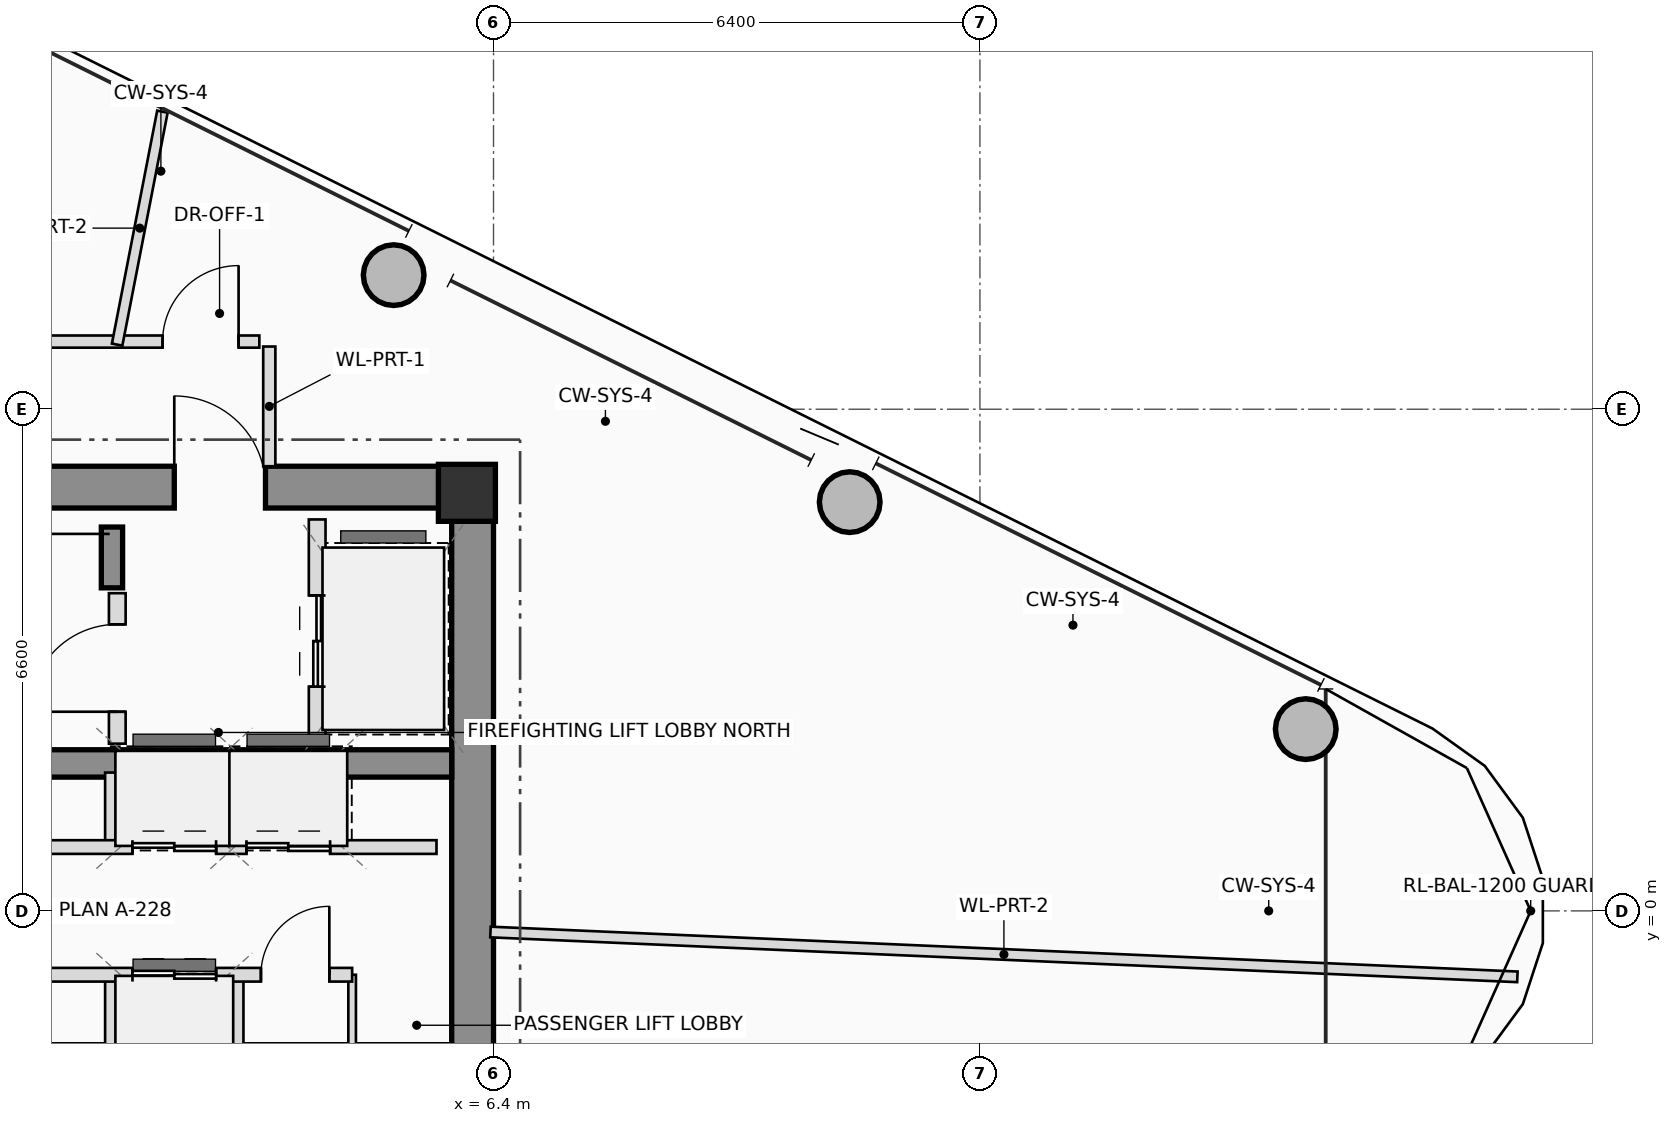
"""IFC4 building model, lengths in metres.
Left out: names, types, materials, properties, quantities, classifications, styles, units other than length and angle.
Written with IfcOpenShell. Run it as: python <this file> out.ifc"""

import sys

from ifc_helpers import new_model, si_unit, direction, frame, frame_2d, origin, origin_2d, place, context, subcontext, project, spatial, rectangle, hollow_circle, extrude, source, transform, mapped, element, fill, save


model = new_model("IFC4")
c1 = context("Model", 3, precision=1e-05, world=origin(), true_north=direction((0.0, 1.0)))
c2 = subcontext(c1, "Body", "Model", "MODEL_VIEW")
j1 = project(units=[si_unit("LENGTHUNIT", "METRE"), si_unit("PLANEANGLEUNIT", "RADIAN")], contexts=[c1])
p1 = place(None, origin())
s1 = spatial("IfcSite", under=j1, at=p1, CompositionType="ELEMENT")
p2 = place(p1, origin())
s2 = spatial("IfcBuilding", under=s1, at=p2, CompositionType="ELEMENT")
p3 = place(p2, frame((0.0, 0.0, 310.55)))
s3 = spatial("IfcBuildingStorey", under=s2, at=p3, CompositionType="ELEMENT", Elevation=310.55)
m1 = source(origin(), c2, "Body", "SweptSolid", [
    extrude(rectangle(XDim=0.75, YDim=0.75, at=origin_2d()), origin(), (0.0, 0.0, 1.0), 3.45),
])
p4 = place(p3, frame((6.05, 5.5, 0.0), z_axis=(0.0, 0.0, 1.0), x_axis=(1.0, 0.0, 0.0)))
e1 = element("IfcColumn", 1, at=p4, inside=s3, PredefinedType="COLUMN", context=c2, shape_type="MappedRepresentation", body=[
    mapped(m1, transform((0.0, 0.0, 0.0), scale=1.0)),
])
p5 = place(p3, frame((-6.4, 5.575, 0.0), z_axis=(0.0, 0.0, 1.0), x_axis=(1.0, 0.0, 0.0)))
e2 = element("IfcWall", 2, at=p5, inside=s3, PredefinedType="SHEAR", context=c2, shape_type="SweptSolid", body=[
    extrude(rectangle(XDim=12.8, YDim=0.55, at=frame_2d((6.4, 0.0))), origin(), (0.0, 0.0, 1.0), 3.45),
])
p6 = place(p5, frame((8.6, 0.0, 0.0)))
e3 = element("IfcOpeningElement", 3, at=p6, cuts=e2, PredefinedType="OPENING", context=c2, shape_type="SweptSolid", body=[
    extrude(rectangle(XDim=1.2, YDim=2.2, at=frame_2d((0.6, 1.1))), frame((0.0, 0.285, 0.0), z_axis=(0.0, -1.0, 0.0), x_axis=(1.0, 0.0, 0.0)), (0.0, 0.0, 1.0), 0.57),
])
p7 = place(p3, frame((6.125, -5.3, 0.0), z_axis=(0.0, 0.0, 1.0), x_axis=(0.0, 1.0, 0.0)))
e4 = element("IfcWall", 4, at=p7, inside=s3, PredefinedType="SHEAR", context=c2, shape_type="SweptSolid", body=[
    extrude(rectangle(XDim=10.6, YDim=0.55, at=frame_2d((5.3, 0.0))), origin(), (0.0, 0.0, 1.0), 3.45),
])
p8 = place(p3, frame((-5.85, 1.94, 0.0), z_axis=(0.0, 0.0, 1.0), x_axis=(1.0, 0.0, 0.0)))
e5 = element("IfcWall", 5, at=p8, inside=s3, PredefinedType="SHEAR", context=c2, shape_type="SweptSolid", body=[
    extrude(rectangle(XDim=11.7, YDim=0.36, at=frame_2d((5.85, 0.0))), origin(), (0.0, 0.0, 1.0), 3.45),
])
p9 = place(p3, frame((1.38, 4.25, 0.0), z_axis=(0.0, 0.0, 1.0), x_axis=(0.0, 1.0, 0.0)))
e6 = element("IfcWall", 6, at=p9, inside=s3, PredefinedType="SHEAR", context=c2, shape_type="SweptSolid", body=[
    extrude(rectangle(XDim=0.8, YDim=0.28, at=frame_2d((0.4, 0.0))), origin(), (0.0, 0.0, 1.0), 3.45),
])
m2 = source(origin(), c2, "Body", "SweptSolid", [
    extrude(hollow_circle(Radius=0.4, WallThickness=0.028, at=origin_2d()), origin(), (0.0, 0.0, 1.0), 3.45),
])
for number, where, z_axis, x_axis in (
    (7, (17.087, 2.392, 0.0), (0.0, 0.0, 1.0), (1.0, 0.0, 0.0)),
    (8, (11.086, 5.378, 0.0), (0.0, 0.0, 1.0), (1.0, 0.0, 0.0)),
    (9, (5.086, 8.364, 0.0), (0.0, 0.0, 1.0), (1.0, 0.0, 0.0)),
):
    element("IfcColumn", number, at=place(p3, frame(where, z_axis=z_axis, x_axis=x_axis)), inside=s3, PredefinedType="COLUMN", context=c2, shape_type="MappedRepresentation", body=[
        mapped(m2, transform((0.0, 0.0, 0.0), scale=1.0)),
    ])
p10 = place(p3, frame((1.45, 2.2, 0.0), z_axis=(0.0, 0.0, 1.0), x_axis=(0.0, 1.0, 0.0)))
e10 = element("IfcWall", 10, at=p10, inside=s3, PredefinedType="PLUMBINGWALL", context=c2, shape_type="SweptSolid", body=[
    extrude(rectangle(XDim=1.98, YDim=0.22, at=frame_2d((0.99, 0.0))), origin(), (0.0, 0.0, 1.0), 3.25),
])
p11 = place(p10, frame((0.42, 0.0, 0.0)))
e11 = element("IfcOpeningElement", 11, at=p11, cuts=e10, PredefinedType="OPENING", context=c2, shape_type="SweptSolid", body=[
    extrude(rectangle(XDim=1.15, YDim=2.15, at=frame_2d((0.575, 1.075))), frame((0.0, 0.12, 0.0), z_axis=(0.0, -1.0, 0.0), x_axis=(1.0, 0.0, 0.0)), (0.0, 0.0, 1.0), 0.24),
])
p12 = place(p3, frame((4.08, 2.2, 0.0), z_axis=(0.0, 0.0, 1.0), x_axis=(0.0, 1.0, 0.0)))
e12 = element("IfcWall", 12, at=p12, inside=s3, PredefinedType="PLUMBINGWALL", context=c2, shape_type="SweptSolid", body=[
    extrude(rectangle(XDim=2.95, YDim=0.22, at=frame_2d((1.475, 0.0))), origin(), (0.0, 0.0, 1.0), 3.25),
])
p13 = place(p12, frame((0.75, 0.0, 0.0)))
e13 = element("IfcOpeningElement", 13, at=p13, cuts=e12, PredefinedType="OPENING", context=c2, shape_type="SweptSolid", body=[
    extrude(rectangle(XDim=1.2, YDim=2.25, at=frame_2d((0.6, 1.125))), frame((0.0, 0.12, 0.0), z_axis=(0.0, -1.0, 0.0), x_axis=(1.0, 0.0, 0.0)), (0.0, 0.0, 1.0), 0.24),
])
for number, where, z_axis, x_axis in (
    (14, (1.38, 0.84, 0.0), (0.0, 0.0, 1.0), (0.0, 1.0, 0.0)),
    (15, (1.38, -1.82, 0.0), (0.0, 0.0, 1.0), (0.0, 1.0, 0.0)),
    (16, (3.02, 0.84, 0.0), (0.0, 0.0, 1.0), (0.0, 1.0, 0.0)),
    (17, (4.38, 0.84, 0.0), (0.0, 0.0, 1.0), (0.0, 1.0, 0.0)),
    (18, (3.02, -1.82, 0.0), (0.0, 0.0, 1.0), (0.0, 1.0, 0.0)),
):
    element("IfcWall", number, at=place(p3, frame(where, z_axis=z_axis, x_axis=x_axis)), inside=s3, PredefinedType="PLUMBINGWALL", context=c2, shape_type="SweptSolid", body=[
        extrude(rectangle(XDim=0.98, YDim=0.18, at=frame_2d((0.49, 0.0))), origin(), (0.0, 0.0, 1.0), 3.25),
    ])
p14 = place(p3, frame((4.54, -1.82, 0.0), z_axis=(0.0, 0.0, 1.0), x_axis=(0.0, 1.0, 0.0)))
e19 = element("IfcWall", 19, at=p14, inside=s3, PredefinedType="PARTITIONING", context=c2, shape_type="SweptSolid", body=[
    extrude(rectangle(XDim=0.98, YDim=0.1, at=frame_2d((0.49, 0.0))), origin(), (0.0, 0.0, 1.0), 3.25),
])
p15 = place(p3, frame((-5.68, 0.84, 0.0), z_axis=(0.0, 0.0, 1.0), x_axis=(1.0, 0.0, 0.0)))
e20 = element("IfcWall", 20, at=p15, inside=s3, PredefinedType="PLUMBINGWALL", context=c2, shape_type="SweptSolid", body=[
    extrude(rectangle(XDim=11.33, YDim=0.18, at=frame_2d((5.665, 0.0))), origin(), (0.0, 0.0, 1.0), 3.25),
])
p16 = place(p15, frame((3.13, 0.0, 0.0)))
e21 = element("IfcOpeningElement", 21, at=p16, cuts=e20, PredefinedType="OPENING", context=c2, shape_type="SweptSolid", body=[
    extrude(rectangle(XDim=0.9, YDim=2.05, at=frame_2d((0.45, 1.025))), frame((0.0, 0.1, 0.0), z_axis=(0.0, -1.0, 0.0), x_axis=(1.0, 0.0, 0.0)), (0.0, 0.0, 1.0), 0.2),
])
p17 = place(p15, frame((7.33, 0.0, 0.0)))
e22 = element("IfcOpeningElement", 22, at=p17, cuts=e20, PredefinedType="OPENING", context=c2, shape_type="SweptSolid", body=[
    extrude(rectangle(XDim=1.1, YDim=2.2, at=frame_2d((0.55, 1.1))), frame((0.0, 0.1, 0.0), z_axis=(0.0, -1.0, 0.0), x_axis=(1.0, 0.0, 0.0)), (0.0, 0.0, 1.0), 0.2),
])
p18 = place(p15, frame((8.83, 0.0, 0.0)))
e23 = element("IfcOpeningElement", 23, at=p18, cuts=e20, PredefinedType="OPENING", context=c2, shape_type="SweptSolid", body=[
    extrude(rectangle(XDim=1.1, YDim=2.2, at=frame_2d((0.55, 1.1))), frame((0.0, 0.1, 0.0), z_axis=(0.0, -1.0, 0.0), x_axis=(1.0, 0.0, 0.0)), (0.0, 0.0, 1.0), 0.2),
])
p19 = place(p3, frame((-5.68, -0.84, 0.0), z_axis=(0.0, 0.0, 1.0), x_axis=(1.0, 0.0, 0.0)))
e24 = element("IfcWall", 24, at=p19, inside=s3, PredefinedType="PLUMBINGWALL", context=c2, shape_type="SweptSolid", body=[
    extrude(rectangle(XDim=10.22, YDim=0.18, at=frame_2d((5.11, 0.0))), origin(), (0.0, 0.0, 1.0), 3.25),
])
p20 = place(p19, frame((1.88, 0.0, 0.0)))
e25 = element("IfcOpeningElement", 25, at=p20, cuts=e24, PredefinedType="OPENING", context=c2, shape_type="SweptSolid", body=[
    extrude(rectangle(XDim=0.9, YDim=2.05, at=frame_2d((0.45, 1.025))), frame((0.0, 0.1, 0.0), z_axis=(0.0, -1.0, 0.0), x_axis=(1.0, 0.0, 0.0)), (0.0, 0.0, 1.0), 0.2),
])
p21 = place(p19, frame((5.35, 0.0, 0.0)))
e26 = element("IfcOpeningElement", 26, at=p21, cuts=e24, PredefinedType="OPENING", context=c2, shape_type="SweptSolid", body=[
    extrude(rectangle(XDim=0.9, YDim=2.05, at=frame_2d((0.45, 1.025))), frame((0.0, 0.1, 0.0), z_axis=(0.0, -1.0, 0.0), x_axis=(1.0, 0.0, 0.0)), (0.0, 0.0, 1.0), 0.2),
])
p22 = place(p19, frame((7.33, 0.0, 0.0)))
e27 = element("IfcOpeningElement", 27, at=p22, cuts=e24, PredefinedType="OPENING", context=c2, shape_type="SweptSolid", body=[
    extrude(rectangle(XDim=1.1, YDim=2.2, at=frame_2d((0.55, 1.1))), frame((0.0, 0.1, 0.0), z_axis=(0.0, -1.0, 0.0), x_axis=(1.0, 0.0, 0.0)), (0.0, 0.0, 1.0), 0.2),
])
p23 = place(p19, frame((9.02, 0.0, 0.0)))
e28 = element("IfcOpeningElement", 28, at=p23, cuts=e24, PredefinedType="OPENING", context=c2, shape_type="SweptSolid", body=[
    extrude(rectangle(XDim=0.9, YDim=2.05, at=frame_2d((0.45, 1.025))), frame((0.0, 0.1, 0.0), z_axis=(0.0, -1.0, 0.0), x_axis=(1.0, 0.0, 0.0)), (0.0, 0.0, 1.0), 0.2),
])
p24 = place(p3, frame((-6.36, 7.49, 0.0), z_axis=(0.0, 0.0, 1.0), x_axis=(1.0, 0.0, 0.0)))
e29 = element("IfcWall", 29, at=p24, inside=s3, PredefinedType="PARTITIONING", context=c2, shape_type="SweptSolid", body=[
    extrude(rectangle(XDim=9.679, YDim=0.16, at=frame_2d((4.84, 0.0))), origin(), (0.0, 0.0, 1.0), 2.655),
])
p25 = place(p24, frame((4.367, 0.0, 0.0)))
e30 = element("IfcOpeningElement", 30, at=p25, cuts=e29, PredefinedType="OPENING", context=c2, shape_type="SweptSolid", body=[
    extrude(rectangle(XDim=1.0, YDim=2.25, at=frame_2d((0.5, 1.125))), frame((0.0, 0.09, 0.0), z_axis=(0.0, -1.0, 0.0), x_axis=(1.0, 0.0, 0.0)), (0.0, 0.0, 1.0), 0.18),
])
p26 = place(p24, frame((8.406, 0.0, 0.0)))
e31 = element("IfcOpeningElement", 31, at=p26, cuts=e29, PredefinedType="OPENING", context=c2, shape_type="SweptSolid", body=[
    extrude(rectangle(XDim=1.0, YDim=2.25, at=frame_2d((0.5, 1.125))), frame((0.0, 0.09, 0.0), z_axis=(0.0, -1.0, 0.0), x_axis=(1.0, 0.0, 0.0)), (0.0, 0.0, 1.0), 0.18),
])
p27 = place(p3, frame((3.45, 7.425, 0.0), z_axis=(0.0, 0.0, 1.0), x_axis=(0.0, -1.0, 0.0)))
e32 = element("IfcWall", 32, at=p27, inside=s3, PredefinedType="PARTITIONING", context=c2, shape_type="SweptSolid", body=[
    extrude(rectangle(XDim=1.575, YDim=0.16, at=frame_2d((0.787, 0.0))), origin(), (0.0, 0.0, 1.0), 2.855),
])
p28 = place(p3, frame((6.36, -0.278, 0.0), z_axis=(0.0, 0.0, 1.0), x_axis=(0.999047623791, -0.043633076864, 0.0)))
e33 = element("IfcWall", 33, at=p28, inside=s3, PredefinedType="PARTITIONING", context=c2, shape_type="SweptSolid", body=[
    extrude(rectangle(XDim=13.524, YDim=0.14, at=frame_2d((6.762, 0.0))), origin(), (0.0, 0.0, 1.0), 2.815),
])
p29 = place(p3, frame((1.448, 7.45, 0.0), z_axis=(0.0, 0.0, 1.0), x_axis=(0.190865473384, 0.981616203549, 0.0)))
e34 = element("IfcWall", 34, at=p29, inside=s3, PredefinedType="PARTITIONING", context=c2, shape_type="SweptSolid", body=[
    extrude(rectangle(XDim=3.122, YDim=0.14, at=frame_2d((1.561, 0.0))), origin(), (0.0, 0.0, 1.0), 2.815),
])
p30 = place(p6, origin())
e35 = element("IfcDoor", 35, at=p30, inside=s3, OperationType="SINGLE_SWING_LEFT", PredefinedType="DOOR", context=c2, shape_type="SweptSolid", body=[
    extrude(rectangle(XDim=1.2, YDim=2.2, at=frame_2d((0.6, 1.1))), frame((0.0, 0.025, 0.0), z_axis=(0.0, -1.0, 0.0), x_axis=(1.0, 0.0, 0.0)), (0.0, 0.0, 1.0), 0.05),
])
fill(e3, e35)
p31 = place(p11, origin())
e36 = element("IfcDoor", 36, at=p31, inside=s3, OperationType="SINGLE_SWING_LEFT", PredefinedType="DOOR", context=c2, shape_type="SweptSolid", body=[
    extrude(rectangle(XDim=1.15, YDim=2.15, at=frame_2d((0.575, 1.075))), frame((0.0, 0.025, 0.0), z_axis=(0.0, -1.0, 0.0), x_axis=(1.0, 0.0, 0.0)), (0.0, 0.0, 1.0), 0.05),
])
fill(e11, e36)
p32 = place(p13, origin())
e37 = element("IfcDoor", 37, at=p32, inside=s3, OperationType="DOUBLE_DOOR_SLIDING", PredefinedType="DOOR", context=c2, shape_type="SweptSolid", body=[
    extrude(rectangle(XDim=1.2, YDim=2.25, at=frame_2d((0.6, 1.125))), frame((0.0, 0.025, 0.0), z_axis=(0.0, -1.0, 0.0), x_axis=(1.0, 0.0, 0.0)), (0.0, 0.0, 1.0), 0.05),
])
fill(e13, e37)
p33 = place(p17, origin())
e38 = element("IfcDoor", 38, at=p33, inside=s3, OperationType="DOUBLE_DOOR_SLIDING", PredefinedType="DOOR", context=c2, shape_type="SweptSolid", body=[
    extrude(rectangle(XDim=1.1, YDim=2.2, at=frame_2d((0.55, 1.1))), frame((0.0, 0.025, 0.0), z_axis=(0.0, -1.0, 0.0), x_axis=(1.0, 0.0, 0.0)), (0.0, 0.0, 1.0), 0.05),
])
fill(e22, e38)
p34 = place(p18, origin())
e39 = element("IfcDoor", 39, at=p34, inside=s3, OperationType="DOUBLE_DOOR_SLIDING", PredefinedType="DOOR", context=c2, shape_type="SweptSolid", body=[
    extrude(rectangle(XDim=1.1, YDim=2.2, at=frame_2d((0.55, 1.1))), frame((0.0, 0.025, 0.0), z_axis=(0.0, -1.0, 0.0), x_axis=(1.0, 0.0, 0.0)), (0.0, 0.0, 1.0), 0.05),
])
fill(e23, e39)
p35 = place(p22, origin())
e40 = element("IfcDoor", 40, at=p35, inside=s3, OperationType="DOUBLE_DOOR_SLIDING", PredefinedType="DOOR", context=c2, shape_type="SweptSolid", body=[
    extrude(rectangle(XDim=1.1, YDim=2.2, at=frame_2d((0.55, 1.1))), frame((0.0, 0.025, 0.0), z_axis=(0.0, -1.0, 0.0), x_axis=(1.0, 0.0, 0.0)), (0.0, 0.0, 1.0), 0.05),
])
fill(e27, e40)
p36 = place(p23, origin())
e41 = element("IfcDoor", 41, at=p36, inside=s3, OperationType="SINGLE_SWING_RIGHT", PredefinedType="DOOR", context=c2, shape_type="SweptSolid", body=[
    extrude(rectangle(XDim=0.9, YDim=2.05, at=frame_2d((0.45, 1.025))), frame((0.0, 0.025, 0.0), z_axis=(0.0, -1.0, 0.0), x_axis=(1.0, 0.0, 0.0)), (0.0, 0.0, 1.0), 0.05),
])
fill(e28, e41)
p37 = place(p26, origin())
e42 = element("IfcDoor", 42, at=p37, inside=s3, OperationType="SINGLE_SWING_RIGHT", PredefinedType="DOOR", context=c2, shape_type="SweptSolid", body=[
    extrude(rectangle(XDim=1.0, YDim=2.25, at=frame_2d((0.5, 1.125))), frame((0.0, 0.025, 0.0), z_axis=(0.0, -1.0, 0.0), x_axis=(1.0, 0.0, 0.0)), (0.0, 0.0, 1.0), 0.05),
])
fill(e31, e42)
save(model, sys.argv[1])
